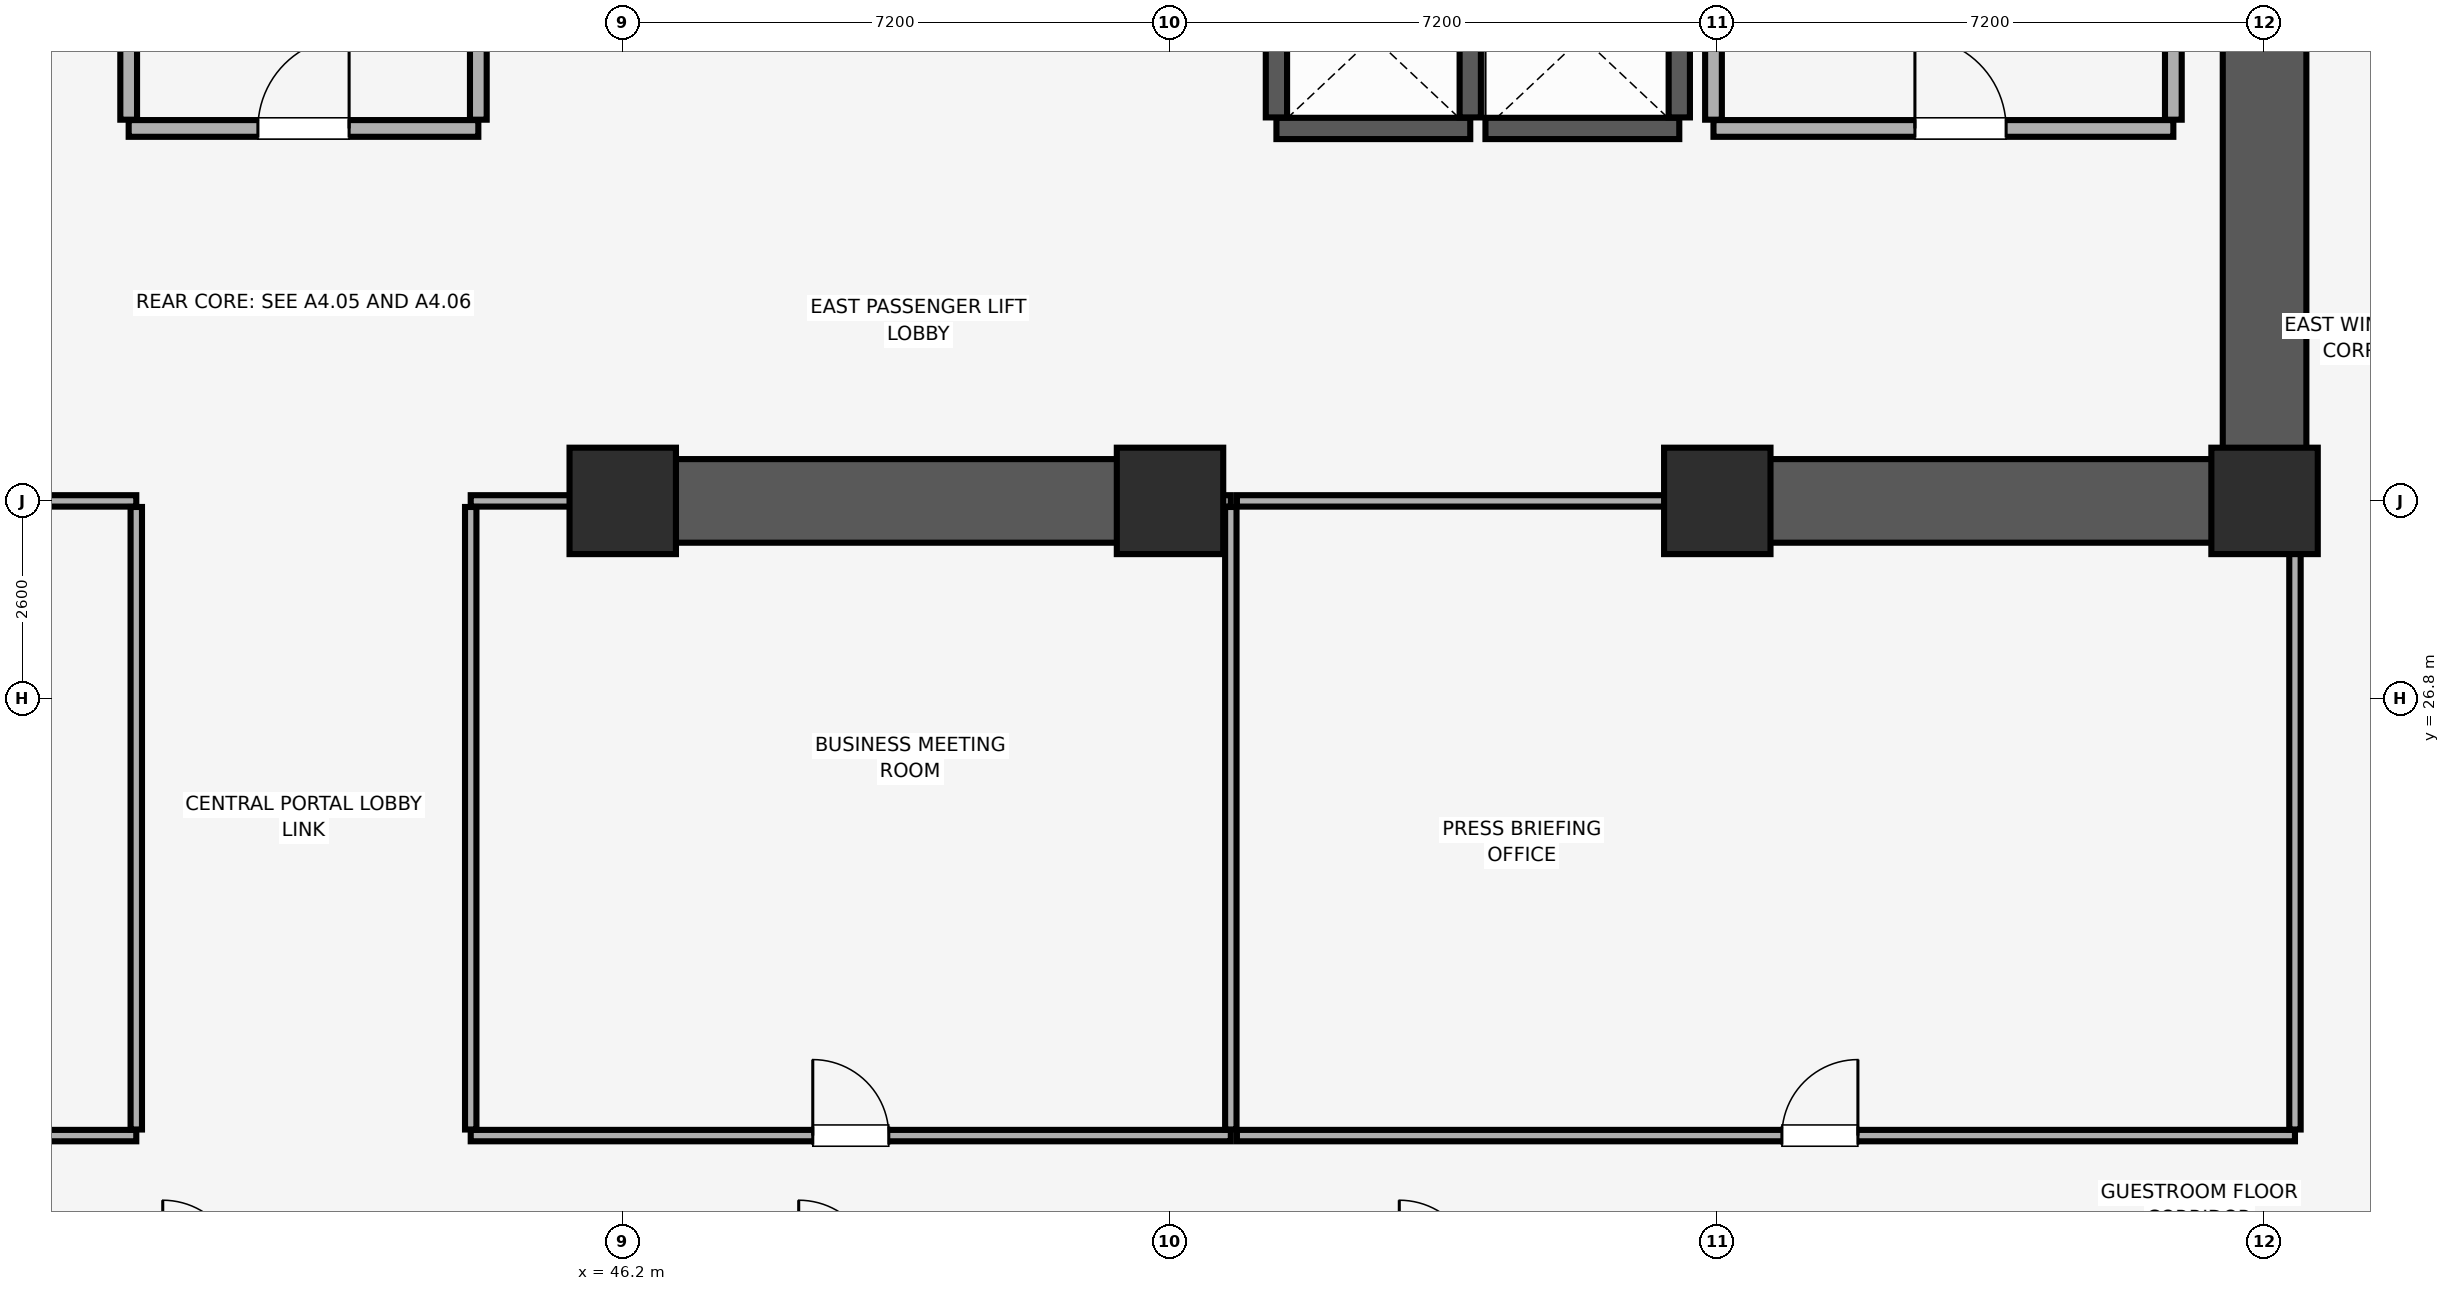
"""IFC4 building model, lengths in metres.
Left out: names, types, materials, properties, quantities, classifications, styles, units other than length and angle.
Written with IfcOpenShell. Run it as: python <this file> out.ifc"""

import sys

from ifc_helpers import new_model, si_unit, direction, frame, frame_2d, origin, origin_2d, place, context, subcontext, project, spatial, rectangle, extrude, element, fill, save


model = new_model("IFC4")
c1 = context("Model", 3, precision=1e-05, world=origin(), true_north=direction((0.0, 1.0)))
c2 = subcontext(c1, "Body", "Model", "MODEL_VIEW")
j1 = project(units=[si_unit("LENGTHUNIT", "METRE"), si_unit("PLANEANGLEUNIT", "RADIAN")], contexts=[c1])
p1 = place(None, origin())
s1 = spatial("IfcSite", under=j1, at=p1, CompositionType="ELEMENT")
p2 = place(p1, origin())
s2 = spatial("IfcBuilding", under=s1, at=p2, CompositionType="ELEMENT")
p3 = place(p2, frame((0.0, 0.0, 76.4)))
s3 = spatial("IfcBuildingStorey", under=s2, at=p3, CompositionType="ELEMENT", Elevation=76.4)
for number, where, z_axis, x_axis in (
    (1, (46.2, 29.4, 0.0), (0.0, 0.0, 1.0), (1.0, 0.0, 0.0)),
    (2, (53.4, 29.4, 0.0), (0.0, 0.0, 1.0), (1.0, 0.0, 0.0)),
    (3, (60.6, 29.4, 0.0), (0.0, 0.0, 1.0), (1.0, 0.0, 0.0)),
    (4, (67.8, 29.4, 0.0), (0.0, 0.0, 1.0), (1.0, 0.0, 0.0)),
):
    element("IfcColumn", number, at=place(p3, frame(where, z_axis=z_axis, x_axis=x_axis)), inside=s3, PredefinedType="COLUMN", context=c2, shape_type="SweptSolid", body=[
        extrude(rectangle(XDim=1.4, YDim=1.4, at=origin_2d()), origin(), (0.0, 0.0, 1.0), 3.4),
    ])
p4 = place(p3, frame((67.8, 29.4, 0.0), z_axis=(0.0, 0.0, 1.0), x_axis=(0.0, 1.0, 0.0)))
e5 = element("IfcWall", 5, at=p4, inside=s3, PredefinedType="SHEAR", context=c2, shape_type="SweptSolid", body=[
    extrude(rectangle(XDim=19.2, YDim=1.1, at=frame_2d((9.6, 0.0))), origin(), (0.0, 0.0, 1.0), 3.4),
])
p5 = place(p3, frame((46.0, 29.4, 0.0), z_axis=(0.0, 0.0, 1.0), x_axis=(1.0, 0.0, 0.0)))
e6 = element("IfcWall", 6, at=p5, inside=s3, PredefinedType="SHEAR", context=c2, shape_type="SweptSolid", body=[
    extrude(rectangle(XDim=7.6, YDim=1.1, at=frame_2d((3.8, 0.0))), origin(), (0.0, 0.0, 1.0), 3.4),
])
p6 = place(p3, frame((60.4, 29.4, 0.0), z_axis=(0.0, 0.0, 1.0), x_axis=(1.0, 0.0, 0.0)))
e7 = element("IfcWall", 7, at=p6, inside=s3, PredefinedType="SHEAR", context=c2, shape_type="SweptSolid", body=[
    extrude(rectangle(XDim=6.845, YDim=1.1, at=frame_2d((3.423, 0.0))), origin(), (0.0, 0.0, 1.0), 3.4),
])
p7 = place(p3, frame((54.8, 34.3, 0.0), z_axis=(0.0, 0.0, 1.0), x_axis=(1.0, 0.0, 0.0)))
e8 = element("IfcWall", 8, at=p7, inside=s3, PredefinedType="SHEAR", context=c2, shape_type="SweptSolid", body=[
    extrude(rectangle(XDim=2.55, YDim=0.28, at=frame_2d((1.275, 0.0))), origin(), (0.0, 0.0, 1.0), 3.4),
])
for number, where, z_axis, x_axis in (
    (9, (54.8, 34.445, 0.0), (0.0, 0.0, 1.0), (0.0, 1.0, 0.0)),
    (10, (57.35, 34.445, 0.0), (0.0, 0.0, 1.0), (0.0, 1.0, 0.0)),
):
    element("IfcWall", number, at=place(p3, frame(where, z_axis=z_axis, x_axis=x_axis)), inside=s3, PredefinedType="SHEAR", context=c2, shape_type="SweptSolid", body=[
        extrude(rectangle(XDim=2.11, YDim=0.28, at=frame_2d((1.055, 0.0))), origin(), (0.0, 0.0, 1.0), 3.4),
    ])
p8 = place(p3, frame((57.55, 34.3, 0.0), z_axis=(0.0, 0.0, 1.0), x_axis=(1.0, 0.0, 0.0)))
e11 = element("IfcWall", 11, at=p8, inside=s3, PredefinedType="SHEAR", context=c2, shape_type="SweptSolid", body=[
    extrude(rectangle(XDim=2.55, YDim=0.28, at=frame_2d((1.275, 0.0))), origin(), (0.0, 0.0, 1.0), 3.4),
])
p9 = place(p3, frame((60.1, 34.445, 0.0), z_axis=(0.0, 0.0, 1.0), x_axis=(0.0, 1.0, 0.0)))
e12 = element("IfcWall", 12, at=p9, inside=s3, PredefinedType="SHEAR", context=c2, shape_type="SweptSolid", body=[
    extrude(rectangle(XDim=2.11, YDim=0.28, at=frame_2d((1.055, 0.0))), origin(), (0.0, 0.0, 1.0), 3.4),
])
p10 = place(p3, frame((60.55, 34.3, 0.0), z_axis=(0.0, 0.0, 1.0), x_axis=(1.0, 0.0, 0.0)))
e13 = element("IfcWall", 13, at=p10, inside=s3, PredefinedType="PARTITIONING", context=c2, shape_type="SweptSolid", body=[
    extrude(rectangle(XDim=6.05, YDim=0.22, at=frame_2d((3.025, 0.0))), origin(), (0.0, 0.0, 1.0), 3.4),
])
p11 = place(p10, frame((2.65, 0.0, 0.0)))
e14 = element("IfcOpeningElement", 14, at=p11, cuts=e13, PredefinedType="OPENING", context=c2, shape_type="SweptSolid", body=[
    extrude(rectangle(XDim=1.2, YDim=2.15, at=frame_2d((0.6, 1.075))), frame((0.0, 0.12, 0.0), z_axis=(0.0, -1.0, 0.0), x_axis=(1.0, 0.0, 0.0)), (0.0, 0.0, 1.0), 0.24),
])
p12 = place(p3, frame((60.55, 34.415, 0.0), z_axis=(0.0, 0.0, 1.0), x_axis=(0.0, 1.0, 0.0)))
e15 = element("IfcWall", 15, at=p12, inside=s3, PredefinedType="PARTITIONING", context=c2, shape_type="SweptSolid", body=[
    extrude(rectangle(XDim=5.64, YDim=0.22, at=frame_2d((2.82, 0.0))), origin(), (0.0, 0.0, 1.0), 3.4),
])
p13 = place(p3, frame((66.6, 34.415, 0.0), z_axis=(0.0, 0.0, 1.0), x_axis=(0.0, 1.0, 0.0)))
e16 = element("IfcWall", 16, at=p13, inside=s3, PredefinedType="PARTITIONING", context=c2, shape_type="SweptSolid", body=[
    extrude(rectangle(XDim=5.43, YDim=0.22, at=frame_2d((2.715, 0.0))), origin(), (0.0, 0.0, 1.0), 3.4),
])
p14 = place(p3, frame((39.7, 34.3, 0.0), z_axis=(0.0, 0.0, 1.0), x_axis=(1.0, 0.0, 0.0)))
e17 = element("IfcWall", 17, at=p14, inside=s3, PredefinedType="PARTITIONING", context=c2, shape_type="SweptSolid", body=[
    extrude(rectangle(XDim=4.6, YDim=0.22, at=frame_2d((2.3, 0.0))), origin(), (0.0, 0.0, 1.0), 3.4),
])
p15 = place(p14, frame((1.7, 0.0, 0.0)))
e18 = element("IfcOpeningElement", 18, at=p15, cuts=e17, PredefinedType="OPENING", context=c2, shape_type="SweptSolid", body=[
    extrude(rectangle(XDim=1.2, YDim=2.15, at=frame_2d((0.6, 1.075))), frame((0.0, 0.12, 0.0), z_axis=(0.0, -1.0, 0.0), x_axis=(1.0, 0.0, 0.0)), (0.0, 0.0, 1.0), 0.24),
])
for number, where, z_axis, x_axis in (
    (19, (39.7, 34.415, 0.0), (0.0, 0.0, 1.0), (0.0, 1.0, 0.0)),
    (20, (44.3, 34.415, 0.0), (0.0, 0.0, 1.0), (0.0, 1.0, 0.0)),
):
    element("IfcWall", number, at=place(p3, frame(where, z_axis=z_axis, x_axis=x_axis)), inside=s3, PredefinedType="PARTITIONING", context=c2, shape_type="SweptSolid", body=[
        extrude(rectangle(XDim=5.785, YDim=0.22, at=frame_2d((2.893, 0.0))), origin(), (0.0, 0.0, 1.0), 3.4),
    ])
p16 = place(p3, frame((25.28, 21.05, 0.0), z_axis=(0.0, 0.0, 1.0), x_axis=(1.0, 0.0, 0.0)))
e21 = element("IfcWall", 21, at=p16, inside=s3, PredefinedType="PARTITIONING", context=c2, shape_type="SweptSolid", body=[
    extrude(rectangle(XDim=14.52, YDim=0.15, at=frame_2d((7.26, 0.0))), origin(), (0.0, 0.0, 1.0), 3.4),
])
p17 = place(p16, frame((6.72, 0.0, 0.0)))
e22 = element("IfcOpeningElement", 22, at=p17, cuts=e21, PredefinedType="OPENING", context=c2, shape_type="SweptSolid", body=[
    extrude(rectangle(XDim=1.0, YDim=2.15, at=frame_2d((0.5, 1.075))), frame((0.0, 0.085, 0.0), z_axis=(0.0, -1.0, 0.0), x_axis=(1.0, 0.0, 0.0)), (0.0, 0.0, 1.0), 0.17),
])
p18 = place(p3, frame((38.01, 29.4, 0.0), z_axis=(0.0, 0.0, 1.0), x_axis=(1.0, 0.0, 0.0)))
e23 = element("IfcWall", 23, at=p18, inside=s3, PredefinedType="PARTITIONING", context=c2, shape_type="SweptSolid", body=[
    extrude(rectangle(XDim=1.79, YDim=0.15, at=frame_2d((0.895, 0.0))), origin(), (0.0, 0.0, 1.0), 2.3),
])
p19 = place(p3, frame((39.8, 21.13, 0.0), z_axis=(0.0, 0.0, 1.0), x_axis=(0.0, 1.0, 0.0)))
e24 = element("IfcWall", 24, at=p19, inside=s3, PredefinedType="PARTITIONING", context=c2, shape_type="SweptSolid", body=[
    extrude(rectangle(XDim=8.19, YDim=0.15, at=frame_2d((4.095, 0.0))), origin(), (0.0, 0.0, 1.0), 3.4),
])
p20 = place(p3, frame((44.2, 21.05, 0.0), z_axis=(0.0, 0.0, 1.0), x_axis=(1.0, 0.0, 0.0)))
e25 = element("IfcWall", 25, at=p20, inside=s3, PredefinedType="PARTITIONING", context=c2, shape_type="SweptSolid", body=[
    extrude(rectangle(XDim=10.0, YDim=0.15, at=frame_2d((5.0, 0.0))), origin(), (0.0, 0.0, 1.0), 3.4),
])
p21 = place(p20, frame((4.5, 0.0, 0.0)))
e26 = element("IfcOpeningElement", 26, at=p21, cuts=e25, PredefinedType="OPENING", context=c2, shape_type="SweptSolid", body=[
    extrude(rectangle(XDim=1.0, YDim=2.15, at=frame_2d((0.5, 1.075))), frame((0.0, 0.085, 0.0), z_axis=(0.0, -1.0, 0.0), x_axis=(1.0, 0.0, 0.0)), (0.0, 0.0, 1.0), 0.17),
])
p22 = place(p3, frame((44.2, 29.4, 0.0), z_axis=(0.0, 0.0, 1.0), x_axis=(1.0, 0.0, 0.0)))
e27 = element("IfcWall", 27, at=p22, inside=s3, PredefinedType="PARTITIONING", context=c2, shape_type="SweptSolid", body=[
    extrude(rectangle(XDim=1.79, YDim=0.15, at=frame_2d((0.895, 0.0))), origin(), (0.0, 0.0, 1.0), 2.3),
])
p23 = place(p3, frame((53.61, 29.4, 0.0), z_axis=(0.0, 0.0, 1.0), x_axis=(1.0, 0.0, 0.0)))
e28 = element("IfcWall", 28, at=p23, inside=s3, PredefinedType="PARTITIONING", context=c2, shape_type="SweptSolid", body=[
    extrude(rectangle(XDim=0.59, YDim=0.15, at=frame_2d((0.295, 0.0))), origin(), (0.0, 0.0, 1.0), 2.3),
])
for number, where, z_axis, x_axis in (
    (29, (44.2, 21.13, 0.0), (0.0, 0.0, 1.0), (0.0, 1.0, 0.0)),
    (30, (54.2, 21.13, 0.0), (0.0, 0.0, 1.0), (0.0, 1.0, 0.0)),
):
    element("IfcWall", number, at=place(p3, frame(where, z_axis=z_axis, x_axis=x_axis)), inside=s3, PredefinedType="PARTITIONING", context=c2, shape_type="SweptSolid", body=[
        extrude(rectangle(XDim=8.19, YDim=0.15, at=frame_2d((4.095, 0.0))), origin(), (0.0, 0.0, 1.0), 3.4),
    ])
p24 = place(p3, frame((54.28, 21.05, 0.0), z_axis=(0.0, 0.0, 1.0), x_axis=(1.0, 0.0, 0.0)))
e31 = element("IfcWall", 31, at=p24, inside=s3, PredefinedType="PARTITIONING", context=c2, shape_type="SweptSolid", body=[
    extrude(rectangle(XDim=13.92, YDim=0.15, at=frame_2d((6.96, 0.0))), origin(), (0.0, 0.0, 1.0), 3.4),
])
p25 = place(p24, frame((7.17, 0.0, 0.0)))
e32 = element("IfcOpeningElement", 32, at=p25, cuts=e31, PredefinedType="OPENING", context=c2, shape_type="SweptSolid", body=[
    extrude(rectangle(XDim=1.0, YDim=2.15, at=frame_2d((0.5, 1.075))), frame((0.0, 0.085, 0.0), z_axis=(0.0, -1.0, 0.0), x_axis=(1.0, 0.0, 0.0)), (0.0, 0.0, 1.0), 0.17),
])
p26 = place(p3, frame((54.28, 29.4, 0.0), z_axis=(0.0, 0.0, 1.0), x_axis=(1.0, 0.0, 0.0)))
e33 = element("IfcWall", 33, at=p26, inside=s3, PredefinedType="PARTITIONING", context=c2, shape_type="SweptSolid", body=[
    extrude(rectangle(XDim=6.11, YDim=0.15, at=frame_2d((3.055, 0.0))), origin(), (0.0, 0.0, 1.0), 2.3),
])
p27 = place(p3, frame((68.2, 21.13, 0.0), z_axis=(0.0, 0.0, 1.0), x_axis=(0.0, 1.0, 0.0)))
e34 = element("IfcWall", 34, at=p27, inside=s3, PredefinedType="PARTITIONING", context=c2, shape_type="SweptSolid", body=[
    extrude(rectangle(XDim=8.26, YDim=0.15, at=frame_2d((4.13, 0.0))), origin(), (0.0, 0.0, 1.0), 3.4),
])
p28 = place(p11, origin())
e35 = element("IfcDoor", 35, at=p28, inside=s3, OperationType="SINGLE_SWING_LEFT", PredefinedType="DOOR", context=c2, shape_type="SweptSolid", body=[
    extrude(rectangle(XDim=1.2, YDim=2.15, at=frame_2d((0.6, 1.075))), frame((0.0, 0.025, 0.0), z_axis=(0.0, -1.0, 0.0), x_axis=(1.0, 0.0, 0.0)), (0.0, 0.0, 1.0), 0.05),
])
fill(e14, e35)
p29 = place(p15, origin())
e36 = element("IfcDoor", 36, at=p29, inside=s3, OperationType="SINGLE_SWING_RIGHT", PredefinedType="DOOR", context=c2, shape_type="SweptSolid", body=[
    extrude(rectangle(XDim=1.2, YDim=2.15, at=frame_2d((0.6, 1.075))), frame((0.0, 0.025, 0.0), z_axis=(0.0, -1.0, 0.0), x_axis=(1.0, 0.0, 0.0)), (0.0, 0.0, 1.0), 0.05),
])
fill(e18, e36)
p30 = place(p21, origin())
e37 = element("IfcDoor", 37, at=p30, inside=s3, OperationType="SINGLE_SWING_LEFT", PredefinedType="DOOR", context=c2, shape_type="SweptSolid", body=[
    extrude(rectangle(XDim=1.0, YDim=2.15, at=frame_2d((0.5, 1.075))), frame((0.0, 0.025, 0.0), z_axis=(0.0, -1.0, 0.0), x_axis=(1.0, 0.0, 0.0)), (0.0, 0.0, 1.0), 0.05),
])
fill(e26, e37)
p31 = place(p25, origin())
e38 = element("IfcDoor", 38, at=p31, inside=s3, OperationType="SINGLE_SWING_RIGHT", PredefinedType="DOOR", context=c2, shape_type="SweptSolid", body=[
    extrude(rectangle(XDim=1.0, YDim=2.15, at=frame_2d((0.5, 1.075))), frame((0.0, 0.025, 0.0), z_axis=(0.0, -1.0, 0.0), x_axis=(1.0, 0.0, 0.0)), (0.0, 0.0, 1.0), 0.05),
])
fill(e32, e38)
save(model, sys.argv[1])
